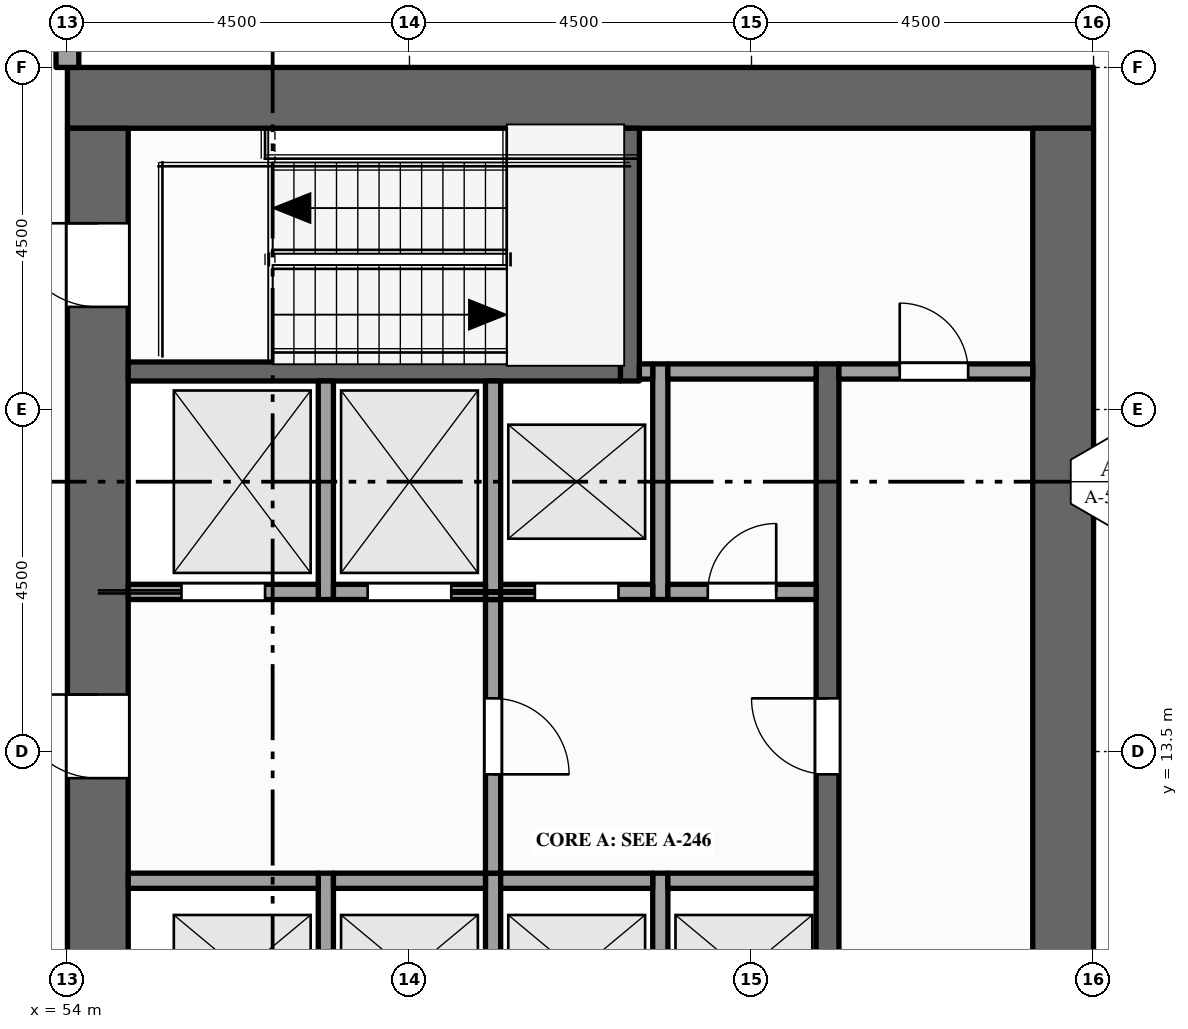
"""IFC4 building model, lengths in metres.
Left out: names, types, materials, properties, quantities, classifications, styles, units other than length and angle.
Written with IfcOpenShell. Run it as: python <this file> out.ifc"""

import sys

from ifc_helpers import new_model, si_unit, direction, frame, frame_2d, origin, place, context, subcontext, project, spatial, rectangle, extrude, element, fill, save


model = new_model("IFC4")
c1 = context("Model", 3, precision=1e-05, world=origin(), true_north=direction((0.0, 1.0)))
c2 = subcontext(c1, "Body", "Model", "MODEL_VIEW")
j1 = project(units=[si_unit("LENGTHUNIT", "METRE"), si_unit("PLANEANGLEUNIT", "RADIAN")], contexts=[c1])
p1 = place(None, origin())
s1 = spatial("IfcSite", under=j1, at=p1, CompositionType="ELEMENT")
p2 = place(p1, origin())
s2 = spatial("IfcBuilding", under=s1, at=p2, CompositionType="ELEMENT")
p3 = place(p2, frame((0.0, 0.0, 261.0)))
s3 = spatial("IfcBuildingStorey", under=s2, at=p3, CompositionType="ELEMENT", Elevation=261.0)
p4 = place(p3, frame((54.0, 22.1, -0.15), z_axis=(0.0, 0.0, 1.0), x_axis=(1.0, 0.0, 0.0)))
e1 = element("IfcWall", 1, at=p4, inside=s3, PredefinedType="SHEAR", context=c2, shape_type="SweptSolid", body=[
    extrude(rectangle(XDim=13.5, YDim=0.8, at=frame_2d((6.75, 0.0))), origin(), (0.0, 0.0, 1.0), 4.0),
])
p5 = place(p3, frame((54.4, 0.8, -0.15), z_axis=(0.0, 0.0, 1.0), x_axis=(0.0, 1.0, 0.0)))
e2 = element("IfcWall", 2, at=p5, inside=s3, PredefinedType="SHEAR", context=c2, shape_type="SweptSolid", body=[
    extrude(rectangle(XDim=20.9, YDim=0.8, at=frame_2d((10.45, 0.0))), origin(), (0.0, 0.0, 1.0), 4.0),
])
p6 = place(p5, frame((6.3, 0.0, 0.15)))
e3 = element("IfcOpeningElement", 3, at=p6, cuts=e2, PredefinedType="OPENING", context=c2, shape_type="SweptSolid", body=[
    extrude(rectangle(XDim=1.8, YDim=2.1, at=frame_2d((0.9, 1.05))), frame((0.0, 0.41, 0.0), z_axis=(0.0, -1.0, 0.0), x_axis=(1.0, 0.0, 0.0)), (0.0, 0.0, 1.0), 0.82),
])
p7 = place(p5, frame((12.35, 0.0, 0.15)))
e4 = element("IfcOpeningElement", 4, at=p7, cuts=e2, PredefinedType="OPENING", context=c2, shape_type="SweptSolid", body=[
    extrude(rectangle(XDim=1.1, YDim=2.1, at=frame_2d((0.55, 1.05))), frame((0.0, 0.41, 0.0), z_axis=(0.0, -1.0, 0.0), x_axis=(1.0, 0.0, 0.0)), (0.0, 0.0, 1.0), 0.82),
])
p8 = place(p5, frame((1.35, 0.0, 0.15)))
e5 = element("IfcOpeningElement", 5, at=p8, cuts=e2, PredefinedType="OPENING", context=c2, shape_type="SweptSolid", body=[
    extrude(rectangle(XDim=1.1, YDim=2.1, at=frame_2d((0.55, 1.05))), frame((0.0, 0.41, 0.0), z_axis=(0.0, -1.0, 0.0), x_axis=(1.0, 0.0, 0.0)), (0.0, 0.0, 1.0), 0.82),
])
p9 = place(p5, frame((18.55, 0.0, 0.15)))
e6 = element("IfcOpeningElement", 6, at=p9, cuts=e2, PredefinedType="OPENING", context=c2, shape_type="SweptSolid", body=[
    extrude(rectangle(XDim=1.1, YDim=2.1, at=frame_2d((0.55, 1.05))), frame((0.0, 0.41, 0.0), z_axis=(0.0, -1.0, 0.0), x_axis=(1.0, 0.0, 0.0)), (0.0, 0.0, 1.0), 0.82),
])
p10 = place(p3, frame((67.1, 0.8, -0.15), z_axis=(0.0, 0.0, 1.0), x_axis=(0.0, 1.0, 0.0)))
e7 = element("IfcWall", 7, at=p10, inside=s3, PredefinedType="SHEAR", context=c2, shape_type="SweptSolid", body=[
    extrude(rectangle(XDim=20.9, YDim=0.8, at=frame_2d((10.45, 0.0))), origin(), (0.0, 0.0, 1.0), 4.0),
])
p11 = place(p3, frame((54.0, 22.5, 0.0), z_axis=(0.0, 0.0, 1.0), x_axis=(0.0, 1.0, 0.0)))
e8 = element("IfcWall", 8, at=p11, inside=s3, PredefinedType="STANDARD", context=c2, shape_type="SweptSolid", body=[
    extrude(rectangle(XDim=1.175, YDim=0.3, at=frame_2d((0.587, 0.0))), origin(), (0.0, 0.0, 1.0), 3.162),
])
p12 = place(p3, frame((57.4, 9.3, 0.0), z_axis=(0.0, 0.0, 1.0), x_axis=(0.0, 1.0, 0.0)))
e9 = element("IfcWall", 9, at=p12, inside=s3, PredefinedType="SOLIDWALL", context=c2, shape_type="SweptSolid", body=[
    extrude(rectangle(XDim=2.6, YDim=0.2, at=frame_2d((1.3, 0.0))), origin(), (0.0, 0.0, 1.0), 3.85),
])
p13 = place(p3, frame((57.4, 15.5, 0.0), z_axis=(0.0, 0.0, 1.0), x_axis=(0.0, 1.0, 0.0)))
e10 = element("IfcWall", 10, at=p13, inside=s3, PredefinedType="SOLIDWALL", context=c2, shape_type="SweptSolid", body=[
    extrude(rectangle(XDim=2.875, YDim=0.2, at=frame_2d((1.438, 0.0))), origin(), (0.0, 0.0, 1.0), 3.85),
])
p14 = place(p3, frame((59.6, 9.3, 0.0), z_axis=(0.0, 0.0, 1.0), x_axis=(0.0, 1.0, 0.0)))
e11 = element("IfcWall", 11, at=p14, inside=s3, PredefinedType="SOLIDWALL", context=c2, shape_type="SweptSolid", body=[
    extrude(rectangle(XDim=2.6, YDim=0.2, at=frame_2d((1.3, 0.0))), origin(), (0.0, 0.0, 1.0), 3.85),
])
p15 = place(p3, frame((59.6, 11.9, 0.0), z_axis=(0.0, 0.0, 1.0), x_axis=(0.0, 1.0, 0.0)))
e12 = element("IfcWall", 12, at=p15, inside=s3, PredefinedType="PARTITIONING", context=c2, shape_type="SweptSolid", body=[
    extrude(rectangle(XDim=3.6, YDim=0.2, at=frame_2d((1.8, 0.0))), origin(), (0.0, 0.0, 1.0), 3.85),
])
p16 = place(p15, frame((1.3, 0.0, 0.0)))
e13 = element("IfcOpeningElement", 13, at=p16, cuts=e12, PredefinedType="OPENING", context=c2, shape_type="SweptSolid", body=[
    extrude(rectangle(XDim=1.0, YDim=2.1, at=frame_2d((0.5, 1.05))), frame((0.0, 0.11, 0.0), z_axis=(0.0, -1.0, 0.0), x_axis=(1.0, 0.0, 0.0)), (0.0, 0.0, 1.0), 0.22),
])
p17 = place(p3, frame((59.6, 15.5, 0.0), z_axis=(0.0, 0.0, 1.0), x_axis=(0.0, 1.0, 0.0)))
e14 = element("IfcWall", 14, at=p17, inside=s3, PredefinedType="SOLIDWALL", context=c2, shape_type="SweptSolid", body=[
    extrude(rectangle(XDim=2.875, YDim=0.2, at=frame_2d((1.438, 0.0))), origin(), (0.0, 0.0, 1.0), 3.85),
])
p18 = place(p3, frame((61.4, 18.375, 0.0), z_axis=(0.0, 0.0, 1.0), x_axis=(0.0, 1.0, 0.0)))
e15 = element("IfcWall", 15, at=p18, inside=s3, PredefinedType="SHEAR", context=c2, shape_type="SweptSolid", body=[
    extrude(rectangle(XDim=3.325, YDim=0.25, at=frame_2d((1.663, 0.0))), origin(), (0.0, 0.0, 1.0), 3.85),
])
p19 = place(p3, frame((61.8, 9.3, 0.0), z_axis=(0.0, 0.0, 1.0), x_axis=(0.0, 1.0, 0.0)))
e16 = element("IfcWall", 16, at=p19, inside=s3, PredefinedType="SOLIDWALL", context=c2, shape_type="SweptSolid", body=[
    extrude(rectangle(XDim=2.6, YDim=0.2, at=frame_2d((1.3, 0.0))), origin(), (0.0, 0.0, 1.0), 3.85),
])
p20 = place(p3, frame((61.8, 15.5, 0.0), z_axis=(0.0, 0.0, 1.0), x_axis=(0.0, 1.0, 0.0)))
e17 = element("IfcWall", 17, at=p20, inside=s3, PredefinedType="SOLIDWALL", context=c2, shape_type="SweptSolid", body=[
    extrude(rectangle(XDim=3.1, YDim=0.2, at=frame_2d((1.55, 0.0))), origin(), (0.0, 0.0, 1.0), 3.85),
])
p21 = place(p3, frame((64.0, 4.1, 0.0), z_axis=(0.0, 0.0, 1.0), x_axis=(0.0, 1.0, 0.0)))
e18 = element("IfcWall", 18, at=p21, inside=s3, PredefinedType="SHEAR", context=c2, shape_type="SweptSolid", body=[
    extrude(rectangle(XDim=14.5, YDim=0.3, at=frame_2d((7.25, 0.0))), origin(), (0.0, 0.0, 1.0), 3.85),
])
p22 = place(p21, frame((3.4, 0.0, 0.0)))
e19 = element("IfcOpeningElement", 19, at=p22, cuts=e18, PredefinedType="OPENING", context=c2, shape_type="SweptSolid", body=[
    extrude(rectangle(XDim=1.0, YDim=2.1, at=frame_2d((0.5, 1.05))), frame((0.0, 0.16, 0.0), z_axis=(0.0, -1.0, 0.0), x_axis=(1.0, 0.0, 0.0)), (0.0, 0.0, 1.0), 0.32),
])
p23 = place(p21, frame((9.1, 0.0, 0.0)))
e20 = element("IfcOpeningElement", 20, at=p23, cuts=e18, PredefinedType="OPENING", context=c2, shape_type="SweptSolid", body=[
    extrude(rectangle(XDim=1.0, YDim=2.1, at=frame_2d((0.5, 1.05))), frame((0.0, 0.16, 0.0), z_axis=(0.0, -1.0, 0.0), x_axis=(1.0, 0.0, 0.0)), (0.0, 0.0, 1.0), 0.32),
])
p24 = place(p3, frame((54.8, 11.8, 0.0), z_axis=(0.0, 0.0, 1.0), x_axis=(1.0, 0.0, 0.0)))
e21 = element("IfcWall", 21, at=p24, inside=s3, PredefinedType="SOLIDWALL", context=c2, shape_type="SweptSolid", body=[
    extrude(rectangle(XDim=2.5, YDim=0.2, at=frame_2d((1.25, 0.0))), origin(), (0.0, 0.0, 1.0), 3.85),
])
for number, where, z_axis, x_axis in (
    (22, (57.5, 11.8, 0.0), (0.0, 0.0, 1.0), (1.0, 0.0, 0.0)),
    (23, (59.7, 11.8, 0.0), (0.0, 0.0, 1.0), (1.0, 0.0, 0.0)),
):
    element("IfcWall", number, at=place(p3, frame(where, z_axis=z_axis, x_axis=x_axis)), inside=s3, PredefinedType="SOLIDWALL", context=c2, shape_type="SweptSolid", body=[
        extrude(rectangle(XDim=2.0, YDim=0.2, at=frame_2d((1.0, 0.0))), origin(), (0.0, 0.0, 1.0), 3.85),
    ])
p25 = place(p3, frame((61.9, 11.8, 0.0), z_axis=(0.0, 0.0, 1.0), x_axis=(1.0, 0.0, 0.0)))
e24 = element("IfcWall", 24, at=p25, inside=s3, PredefinedType="SOLIDWALL", context=c2, shape_type="SweptSolid", body=[
    extrude(rectangle(XDim=1.95, YDim=0.2, at=frame_2d((0.975, 0.0))), origin(), (0.0, 0.0, 1.0), 3.85),
])
p26 = place(p3, frame((54.8, 15.6, 0.0), z_axis=(0.0, 0.0, 1.0), x_axis=(1.0, 0.0, 0.0)))
e25 = element("IfcWall", 25, at=p26, inside=s3, PredefinedType="SOLIDWALL", context=c2, shape_type="SweptSolid", body=[
    extrude(rectangle(XDim=2.5, YDim=0.2, at=frame_2d((1.25, 0.0))), origin(), (0.0, 0.0, 1.0), 3.85),
])
p27 = place(p26, frame((0.7, 0.0, 0.012)))
e26 = element("IfcOpeningElement", 26, at=p27, cuts=e25, PredefinedType="OPENING", context=c2, shape_type="SweptSolid", body=[
    extrude(rectangle(XDim=1.1, YDim=2.1, at=frame_2d((0.55, 1.05))), frame((0.0, 0.11, 0.0), z_axis=(0.0, -1.0, 0.0), x_axis=(1.0, 0.0, 0.0)), (0.0, 0.0, 1.0), 0.22),
])
p28 = place(p3, frame((57.5, 15.6, 0.0), z_axis=(0.0, 0.0, 1.0), x_axis=(1.0, 0.0, 0.0)))
e27 = element("IfcWall", 27, at=p28, inside=s3, PredefinedType="SOLIDWALL", context=c2, shape_type="SweptSolid", body=[
    extrude(rectangle(XDim=2.0, YDim=0.2, at=frame_2d((1.0, 0.0))), origin(), (0.0, 0.0, 1.0), 3.85),
])
p29 = place(p28, frame((0.45, 0.0, 0.012)))
e28 = element("IfcOpeningElement", 28, at=p29, cuts=e27, PredefinedType="OPENING", context=c2, shape_type="SweptSolid", body=[
    extrude(rectangle(XDim=1.1, YDim=2.1, at=frame_2d((0.55, 1.05))), frame((0.0, 0.11, 0.0), z_axis=(0.0, -1.0, 0.0), x_axis=(1.0, 0.0, 0.0)), (0.0, 0.0, 1.0), 0.22),
])
p30 = place(p3, frame((59.7, 15.6, 0.0), z_axis=(0.0, 0.0, 1.0), x_axis=(1.0, 0.0, 0.0)))
e29 = element("IfcWall", 29, at=p30, inside=s3, PredefinedType="SOLIDWALL", context=c2, shape_type="SweptSolid", body=[
    extrude(rectangle(XDim=2.0, YDim=0.2, at=frame_2d((1.0, 0.0))), origin(), (0.0, 0.0, 1.0), 3.85),
])
p31 = place(p30, frame((0.45, 0.0, 0.012)))
e30 = element("IfcOpeningElement", 30, at=p31, cuts=e29, PredefinedType="OPENING", context=c2, shape_type="SweptSolid", body=[
    extrude(rectangle(XDim=1.1, YDim=2.1, at=frame_2d((0.55, 1.05))), frame((0.0, 0.11, 0.0), z_axis=(0.0, -1.0, 0.0), x_axis=(1.0, 0.0, 0.0)), (0.0, 0.0, 1.0), 0.22),
])
p32 = place(p3, frame((61.9, 15.6, 0.0), z_axis=(0.0, 0.0, 1.0), x_axis=(1.0, 0.0, 0.0)))
e31 = element("IfcWall", 31, at=p32, inside=s3, PredefinedType="PARTITIONING", context=c2, shape_type="SweptSolid", body=[
    extrude(rectangle(XDim=1.95, YDim=0.2, at=frame_2d((0.975, 0.0))), origin(), (0.0, 0.0, 1.0), 3.85),
])
p33 = place(p32, frame((0.525, 0.0, 0.0)))
e32 = element("IfcOpeningElement", 32, at=p33, cuts=e31, PredefinedType="OPENING", context=c2, shape_type="SweptSolid", body=[
    extrude(rectangle(XDim=0.9, YDim=2.1, at=frame_2d((0.45, 1.05))), frame((0.0, 0.11, 0.0), z_axis=(0.0, -1.0, 0.0), x_axis=(1.0, 0.0, 0.0)), (0.0, 0.0, 1.0), 0.22),
])
p34 = place(p3, frame((54.8, 18.5, 0.0), z_axis=(0.0, 0.0, 1.0), x_axis=(1.0, 0.0, 0.0)))
e33 = element("IfcWall", 33, at=p34, inside=s3, PredefinedType="SHEAR", context=c2, shape_type="SweptSolid", body=[
    extrude(rectangle(XDim=6.475, YDim=0.25, at=frame_2d((3.237, 0.0))), origin(), (0.0, 0.0, 1.0), 3.85),
])
p35 = place(p3, frame((61.525, 18.5, 0.0), z_axis=(0.0, 0.0, 1.0), x_axis=(1.0, 0.0, 0.0)))
e34 = element("IfcWall", 34, at=p35, inside=s3, PredefinedType="SOLIDWALL", context=c2, shape_type="SweptSolid", body=[
    extrude(rectangle(XDim=0.175, YDim=0.2, at=frame_2d((0.087, 0.0))), origin(), (0.0, 0.0, 1.0), 3.85),
])
p36 = place(p3, frame((61.9, 18.5, 0.0), z_axis=(0.0, 0.0, 1.0), x_axis=(1.0, 0.0, 0.0)))
e35 = element("IfcWall", 35, at=p36, inside=s3, PredefinedType="PARTITIONING", context=c2, shape_type="SweptSolid", body=[
    extrude(rectangle(XDim=1.95, YDim=0.2, at=frame_2d((0.975, 0.0))), origin(), (0.0, 0.0, 1.0), 3.85),
])
p37 = place(p3, frame((64.15, 18.5, 0.0), z_axis=(0.0, 0.0, 1.0), x_axis=(1.0, 0.0, 0.0)))
e36 = element("IfcWall", 36, at=p37, inside=s3, PredefinedType="PARTITIONING", context=c2, shape_type="SweptSolid", body=[
    extrude(rectangle(XDim=2.55, YDim=0.2, at=frame_2d((1.275, 0.0))), origin(), (0.0, 0.0, 1.0), 3.85),
])
p38 = place(p37, frame((0.8, 0.0, 0.0)))
e37 = element("IfcOpeningElement", 37, at=p38, cuts=e36, PredefinedType="OPENING", context=c2, shape_type="SweptSolid", body=[
    extrude(rectangle(XDim=0.9, YDim=2.1, at=frame_2d((0.45, 1.05))), frame((0.0, 0.11, 0.0), z_axis=(0.0, -1.0, 0.0), x_axis=(1.0, 0.0, 0.0)), (0.0, 0.0, 1.0), 0.22),
])
p39 = place(p27, origin())
e38 = element("IfcDoor", 38, at=p39, inside=s3, OperationType="SLIDING_TO_LEFT", PredefinedType="DOOR", context=c2, shape_type="SweptSolid", body=[
    extrude(rectangle(XDim=1.1, YDim=2.1, at=frame_2d((0.55, 1.05))), frame((0.0, 0.025, 0.0), z_axis=(0.0, -1.0, 0.0), x_axis=(1.0, 0.0, 0.0)), (0.0, 0.0, 1.0), 0.05),
])
fill(e26, e38)
p40 = place(p29, origin())
e39 = element("IfcDoor", 39, at=p40, inside=s3, OperationType="SLIDING_TO_RIGHT", PredefinedType="DOOR", context=c2, shape_type="SweptSolid", body=[
    extrude(rectangle(XDim=1.1, YDim=2.1, at=frame_2d((0.55, 1.05))), frame((0.0, 0.025, 0.0), z_axis=(0.0, -1.0, 0.0), x_axis=(1.0, 0.0, 0.0)), (0.0, 0.0, 1.0), 0.05),
])
fill(e28, e39)
p41 = place(p31, origin())
e40 = element("IfcDoor", 40, at=p41, inside=s3, OperationType="SLIDING_TO_LEFT", PredefinedType="DOOR", context=c2, shape_type="SweptSolid", body=[
    extrude(rectangle(XDim=1.1, YDim=2.1, at=frame_2d((0.55, 1.05))), frame((0.0, 0.025, 0.0), z_axis=(0.0, -1.0, 0.0), x_axis=(1.0, 0.0, 0.0)), (0.0, 0.0, 1.0), 0.05),
])
fill(e30, e40)
p42 = place(p7, origin())
e41 = element("IfcDoor", 41, at=p42, inside=s3, OperationType="SINGLE_SWING_RIGHT", PredefinedType="DOOR", context=c2, shape_type="SweptSolid", body=[
    extrude(rectangle(XDim=1.1, YDim=2.1, at=frame_2d((0.55, 1.05))), frame((0.0, 0.025, 0.0), z_axis=(0.0, -1.0, 0.0), x_axis=(1.0, 0.0, 0.0)), (0.0, 0.0, 1.0), 0.05),
])
fill(e4, e41)
p43 = place(p16, origin())
e42 = element("IfcDoor", 42, at=p43, inside=s3, OperationType="SINGLE_SWING_LEFT", PredefinedType="DOOR", context=c2, shape_type="SweptSolid", body=[
    extrude(rectangle(XDim=1.0, YDim=2.1, at=frame_2d((0.5, 1.05))), frame((0.0, 0.025, 0.0), z_axis=(0.0, -1.0, 0.0), x_axis=(1.0, 0.0, 0.0)), (0.0, 0.0, 1.0), 0.05),
])
fill(e13, e42)
p44 = place(p23, origin())
e43 = element("IfcDoor", 43, at=p44, inside=s3, OperationType="SINGLE_SWING_RIGHT", PredefinedType="DOOR", context=c2, shape_type="SweptSolid", body=[
    extrude(rectangle(XDim=1.0, YDim=2.1, at=frame_2d((0.5, 1.05))), frame((0.0, 0.025, 0.0), z_axis=(0.0, -1.0, 0.0), x_axis=(1.0, 0.0, 0.0)), (0.0, 0.0, 1.0), 0.05),
])
fill(e20, e43)
p45 = place(p9, origin())
e44 = element("IfcDoor", 44, at=p45, inside=s3, OperationType="SINGLE_SWING_RIGHT", PredefinedType="DOOR", context=c2, shape_type="SweptSolid", body=[
    extrude(rectangle(XDim=1.1, YDim=2.1, at=frame_2d((0.55, 1.05))), frame((0.0, 0.025, 0.0), z_axis=(0.0, -1.0, 0.0), x_axis=(1.0, 0.0, 0.0)), (0.0, 0.0, 1.0), 0.05),
])
fill(e6, e44)
p46 = place(p38, origin())
e45 = element("IfcDoor", 45, at=p46, inside=s3, OperationType="SINGLE_SWING_LEFT", PredefinedType="DOOR", context=c2, shape_type="SweptSolid", body=[
    extrude(rectangle(XDim=0.9, YDim=2.1, at=frame_2d((0.45, 1.05))), frame((0.0, 0.025, 0.0), z_axis=(0.0, -1.0, 0.0), x_axis=(1.0, 0.0, 0.0)), (0.0, 0.0, 1.0), 0.05),
])
fill(e37, e45)
p47 = place(p33, origin())
e46 = element("IfcDoor", 46, at=p47, inside=s3, OperationType="SINGLE_SWING_RIGHT", PredefinedType="DOOR", context=c2, shape_type="SweptSolid", body=[
    extrude(rectangle(XDim=0.9, YDim=2.1, at=frame_2d((0.45, 1.05))), frame((0.0, 0.025, 0.0), z_axis=(0.0, -1.0, 0.0), x_axis=(1.0, 0.0, 0.0)), (0.0, 0.0, 1.0), 0.05),
])
fill(e32, e46)
save(model, sys.argv[1])
